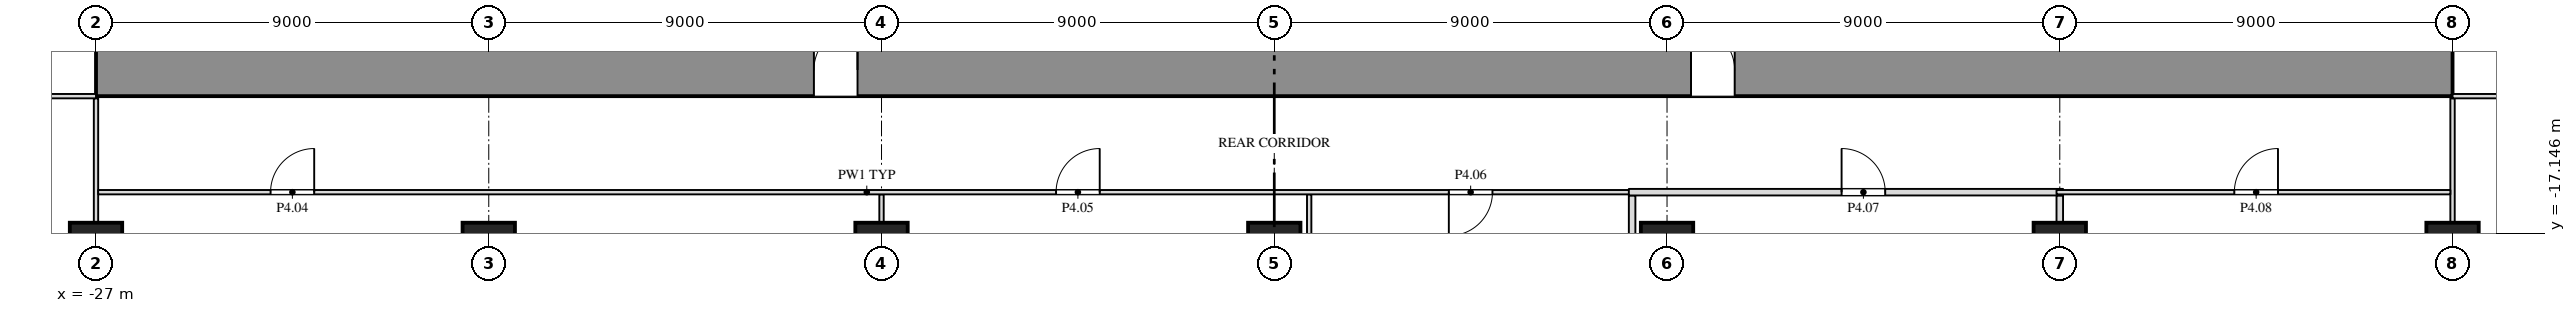
"""IFC4 building model, lengths in metres.
Left out: names, types, materials, properties, quantities, classifications, styles, units other than length and angle.
Written with IfcOpenShell. Run it as: python <this file> out.ifc"""

import sys

from ifc_helpers import new_model, si_unit, direction, frame, frame_2d, origin, origin_2d, place, context, subcontext, project, spatial, rectangle, extrude, element, fill, save


model = new_model("IFC4")
c1 = context("Model", 3, precision=1e-05, world=origin(), true_north=direction((0.0, 1.0)))
c2 = subcontext(c1, "Body", "Model", "MODEL_VIEW")
j1 = project(units=[si_unit("LENGTHUNIT", "METRE"), si_unit("PLANEANGLEUNIT", "RADIAN")], contexts=[c1])
p1 = place(None, origin())
s1 = spatial("IfcSite", under=j1, at=p1, CompositionType="ELEMENT")
p2 = place(p1, origin())
s2 = spatial("IfcBuilding", under=s1, at=p2, CompositionType="ELEMENT")
p3 = place(p2, frame((0.0, 0.0, 27.0)))
s3 = spatial("IfcBuildingStorey", under=s2, at=p3, CompositionType="ELEMENT", Elevation=27.0)
for number, where, z_axis, x_axis in (
    (1, (-27.0, -17.5, 0.0), (0.0, 0.0, 1.0), (1.0, 0.0, 0.0)),
    (2, (-18.0, -17.5, 0.0), (0.0, 0.0, 1.0), (1.0, 0.0, 0.0)),
    (3, (-9.0, -17.5, 0.0), (0.0, 0.0, 1.0), (1.0, 0.0, 0.0)),
    (4, (0.0, -17.5, 0.0), (0.0, 0.0, 1.0), (1.0, 0.0, 0.0)),
    (5, (9.0, -17.5, 0.0), (0.0, 0.0, 1.0), (1.0, 0.0, 0.0)),
    (6, (18.0, -17.5, 0.0), (0.0, 0.0, 1.0), (1.0, 0.0, 0.0)),
    (7, (27.0, -17.5, 0.0), (0.0, 0.0, 1.0), (1.0, 0.0, 0.0)),
):
    element("IfcColumn", number, at=place(p3, frame(where, z_axis=z_axis, x_axis=x_axis)), inside=s3, PredefinedType="COLUMN", context=c2, shape_type="SweptSolid", body=[
        extrude(rectangle(XDim=1.2, YDim=1.2, at=origin_2d()), origin(), (0.0, 0.0, 1.0), 6.0),
    ])
p4 = place(p3, frame((-27.0, -13.4, 0.0), z_axis=(0.0, 0.0, 1.0), x_axis=(1.0, 0.0, 0.0)))
e8 = element("IfcWall", 8, at=p4, inside=s3, PredefinedType="SHEAR", context=c2, shape_type="SweptSolid", body=[
    extrude(rectangle(XDim=54.0, YDim=1.2, at=frame_2d((27.0, 0.0))), origin(), (0.0, 0.0, 1.0), 5.7),
])
p5 = place(p4, frame((16.45, 0.0, 0.0)))
e9 = element("IfcOpeningElement", 9, at=p5, cuts=e8, PredefinedType="OPENING", context=c2, shape_type="SweptSolid", body=[
    extrude(rectangle(XDim=1.0, YDim=2.1, at=frame_2d((0.5, 1.05))), frame((0.0, 0.612, 0.0), z_axis=(0.0, -1.0, 0.0), x_axis=(1.0, 0.0, 0.0)), (0.0, 0.0, 1.0), 1.224),
])
p6 = place(p4, frame((36.55, 0.0, 0.0)))
e10 = element("IfcOpeningElement", 10, at=p6, cuts=e8, PredefinedType="OPENING", context=c2, shape_type="SweptSolid", body=[
    extrude(rectangle(XDim=1.0, YDim=2.1, at=frame_2d((0.5, 1.05))), frame((0.0, 0.612, 0.0), z_axis=(0.0, -1.0, 0.0), x_axis=(1.0, 0.0, 0.0)), (0.0, 0.0, 1.0), 1.224),
])
p7 = place(p3, frame((-27.0, -16.9, 0.0), z_axis=(0.0, 0.0, 1.0), x_axis=(0.0, 1.0, 0.0)))
e11 = element("IfcWall", 11, at=p7, inside=s3, PredefinedType="PARTITIONING", context=c2, shape_type="SweptSolid", body=[
    extrude(rectangle(XDim=2.85, YDim=0.1, at=frame_2d((1.425, 0.0))), origin(), (0.0, 0.0, 1.0), 5.088),
])
p8 = place(p3, frame((-9.0, -16.9, 0.0), z_axis=(0.0, 0.0, 1.0), x_axis=(0.0, 1.0, 0.0)))
e12 = element("IfcWall", 12, at=p8, inside=s3, PredefinedType="PARTITIONING", context=c2, shape_type="SweptSolid", body=[
    extrude(rectangle(XDim=0.65, YDim=0.1, at=frame_2d((0.325, 0.0))), origin(), (0.0, 0.0, 1.0), 5.7),
])
p9 = place(p3, frame((0.8, -27.2, 0.0), z_axis=(0.0, 0.0, 1.0), x_axis=(0.0, 1.0, 0.0)))
e13 = element("IfcWall", 13, at=p9, inside=s3, PredefinedType="PARTITIONING", context=c2, shape_type="SweptSolid", body=[
    extrude(rectangle(XDim=10.95, YDim=0.1, at=frame_2d((5.475, 0.0))), origin(), (0.0, 0.0, 1.0), 5.7),
])
p10 = place(p3, frame((8.2, -27.2, 0.0), z_axis=(0.0, 0.0, 1.0), x_axis=(0.0, 1.0, 0.0)))
e14 = element("IfcWall", 14, at=p10, inside=s3, PredefinedType="PARTITIONING", context=c2, shape_type="SweptSolid", body=[
    extrude(rectangle(XDim=10.925, YDim=0.15, at=frame_2d((5.462, 0.0))), origin(), (0.0, 0.0, 1.0), 5.7),
])
p11 = place(p3, frame((18.0, -16.9, 0.0), z_axis=(0.0, 0.0, 1.0), x_axis=(0.0, 1.0, 0.0)))
e15 = element("IfcWall", 15, at=p11, inside=s3, PredefinedType="PARTITIONING", context=c2, shape_type="SweptSolid", body=[
    extrude(rectangle(XDim=0.625, YDim=0.15, at=frame_2d((0.312, 0.0))), origin(), (0.0, 0.0, 1.0), 5.7),
])
p12 = place(p3, frame((27.0, -16.9, 0.0), z_axis=(0.0, 0.0, 1.0), x_axis=(0.0, 1.0, 0.0)))
e16 = element("IfcWall", 16, at=p12, inside=s3, PredefinedType="PARTITIONING", context=c2, shape_type="SweptSolid", body=[
    extrude(rectangle(XDim=2.85, YDim=0.1, at=frame_2d((1.425, 0.0))), origin(), (0.0, 0.0, 1.0), 5.088),
])
p13 = place(p3, frame((-26.95, -16.2, 0.0), z_axis=(0.0, 0.0, 1.0), x_axis=(1.0, 0.0, 0.0)))
e17 = element("IfcWall", 17, at=p13, inside=s3, PredefinedType="PARTITIONING", context=c2, shape_type="SweptSolid", body=[
    extrude(rectangle(XDim=35.225, YDim=0.1, at=frame_2d((17.612, 0.0))), origin(), (0.0, 0.0, 1.0), 5.7),
])
p14 = place(p13, frame((3.95, 0.0, 0.0)))
e18 = element("IfcOpeningElement", 18, at=p14, cuts=e17, PredefinedType="OPENING", context=c2, shape_type="SweptSolid", body=[
    extrude(rectangle(XDim=1.0, YDim=2.1, at=frame_2d((0.5, 1.05))), frame((0.0, 0.062, 0.0), z_axis=(0.0, -1.0, 0.0), x_axis=(1.0, 0.0, 0.0)), (0.0, 0.0, 1.0), 0.124),
])
p15 = place(p13, frame((21.95, 0.0, 0.0)))
e19 = element("IfcOpeningElement", 19, at=p15, cuts=e17, PredefinedType="OPENING", context=c2, shape_type="SweptSolid", body=[
    extrude(rectangle(XDim=1.0, YDim=2.1, at=frame_2d((0.5, 1.05))), frame((0.0, 0.062, 0.0), z_axis=(0.0, -1.0, 0.0), x_axis=(1.0, 0.0, 0.0)), (0.0, 0.0, 1.0), 0.124),
])
p16 = place(p13, frame((30.95, 0.0, 0.0)))
e20 = element("IfcOpeningElement", 20, at=p16, cuts=e17, PredefinedType="OPENING", context=c2, shape_type="SweptSolid", body=[
    extrude(rectangle(XDim=1.0, YDim=2.1, at=frame_2d((0.5, 1.05))), frame((0.0, 0.062, 0.0), z_axis=(0.0, -1.0, 0.0), x_axis=(1.0, 0.0, 0.0)), (0.0, 0.0, 1.0), 0.124),
])
p17 = place(p3, frame((8.125, -16.2, 0.0), z_axis=(0.0, 0.0, 1.0), x_axis=(1.0, 0.0, 0.0)))
e21 = element("IfcWall", 21, at=p17, inside=s3, PredefinedType="PARTITIONING", context=c2, shape_type="SweptSolid", body=[
    extrude(rectangle(XDim=9.95, YDim=0.15, at=frame_2d((4.975, 0.0))), origin(), (0.0, 0.0, 1.0), 5.7),
])
p18 = place(p17, frame((4.875, 0.0, 0.0)))
e22 = element("IfcOpeningElement", 22, at=p18, cuts=e21, PredefinedType="OPENING", context=c2, shape_type="SweptSolid", body=[
    extrude(rectangle(XDim=1.0, YDim=2.1, at=frame_2d((0.5, 1.05))), frame((0.0, 0.087, 0.0), z_axis=(0.0, -1.0, 0.0), x_axis=(1.0, 0.0, 0.0)), (0.0, 0.0, 1.0), 0.174),
])
p19 = place(p3, frame((17.925, -16.2, 0.0), z_axis=(0.0, 0.0, 1.0), x_axis=(1.0, 0.0, 0.0)))
e23 = element("IfcWall", 23, at=p19, inside=s3, PredefinedType="PARTITIONING", context=c2, shape_type="SweptSolid", body=[
    extrude(rectangle(XDim=9.025, YDim=0.1, at=frame_2d((4.512, 0.0))), origin(), (0.0, 0.0, 1.0), 5.7),
])
p20 = place(p19, frame((4.075, 0.0, 0.0)))
e24 = element("IfcOpeningElement", 24, at=p20, cuts=e23, PredefinedType="OPENING", context=c2, shape_type="SweptSolid", body=[
    extrude(rectangle(XDim=1.0, YDim=2.1, at=frame_2d((0.5, 1.05))), frame((0.0, 0.062, 0.0), z_axis=(0.0, -1.0, 0.0), x_axis=(1.0, 0.0, 0.0)), (0.0, 0.0, 1.0), 0.124),
])
p21 = place(p3, frame((-38.2, -14.0, 0.0), z_axis=(0.0, 0.0, 1.0), x_axis=(1.0, 0.0, 0.0)))
e25 = element("IfcWall", 25, at=p21, inside=s3, PredefinedType="PARTITIONING", context=c2, shape_type="SweptSolid", body=[
    extrude(rectangle(XDim=11.2, YDim=0.1, at=frame_2d((5.6, 0.0))), origin(), (0.0, 0.0, 1.0), 5.7),
])
p22 = place(p21, frame((3.2, 0.0, 0.0)))
e26 = element("IfcOpeningElement", 26, at=p22, cuts=e25, PredefinedType="OPENING", context=c2, shape_type="SweptSolid", body=[
    extrude(rectangle(XDim=1.0, YDim=2.1, at=frame_2d((0.5, 1.05))), frame((0.0, 0.062, 0.0), z_axis=(0.0, -1.0, 0.0), x_axis=(1.0, 0.0, 0.0)), (0.0, 0.0, 1.0), 0.124),
])
p23 = place(p3, frame((27.0, -14.0, 0.0), z_axis=(0.0, 0.0, 1.0), x_axis=(1.0, 0.0, 0.0)))
e27 = element("IfcWall", 27, at=p23, inside=s3, PredefinedType="PARTITIONING", context=c2, shape_type="SweptSolid", body=[
    extrude(rectangle(XDim=11.2, YDim=0.1, at=frame_2d((5.6, 0.0))), origin(), (0.0, 0.0, 1.0), 5.7),
])
p24 = place(p23, frame((7.0, 0.0, 0.0)))
e28 = element("IfcOpeningElement", 28, at=p24, cuts=e27, PredefinedType="OPENING", context=c2, shape_type="SweptSolid", body=[
    extrude(rectangle(XDim=1.0, YDim=2.1, at=frame_2d((0.5, 1.05))), frame((0.0, 0.062, 0.0), z_axis=(0.0, -1.0, 0.0), x_axis=(1.0, 0.0, 0.0)), (0.0, 0.0, 1.0), 0.124),
])
p25 = place(p14, origin())
e29 = element("IfcDoor", 29, at=p25, inside=s3, OperationType="SINGLE_SWING_RIGHT", PredefinedType="DOOR", context=c2, shape_type="SweptSolid", body=[
    extrude(rectangle(XDim=1.0, YDim=2.1, at=frame_2d((0.5, 1.05))), frame((0.0, 0.025, 0.0), z_axis=(0.0, -1.0, 0.0), x_axis=(1.0, 0.0, 0.0)), (0.0, 0.0, 1.0), 0.05),
])
fill(e18, e29)
p26 = place(p15, origin())
e30 = element("IfcDoor", 30, at=p26, inside=s3, OperationType="SINGLE_SWING_RIGHT", PredefinedType="DOOR", context=c2, shape_type="SweptSolid", body=[
    extrude(rectangle(XDim=1.0, YDim=2.1, at=frame_2d((0.5, 1.05))), frame((0.0, 0.025, 0.0), z_axis=(0.0, -1.0, 0.0), x_axis=(1.0, 0.0, 0.0)), (0.0, 0.0, 1.0), 0.05),
])
fill(e19, e30)
p27 = place(p16, origin())
e31 = element("IfcDoor", 31, at=p27, inside=s3, OperationType="SINGLE_SWING_RIGHT", PredefinedType="DOOR", context=c2, shape_type="SweptSolid", body=[
    extrude(rectangle(XDim=1.0, YDim=2.1, at=frame_2d((0.5, 1.05))), frame((0.0, 0.025, 0.0), z_axis=(0.0, -1.0, 0.0), x_axis=(1.0, 0.0, 0.0)), (0.0, 0.0, 1.0), 0.05),
])
fill(e20, e31)
p28 = place(p18, origin())
e32 = element("IfcDoor", 32, at=p28, inside=s3, OperationType="SINGLE_SWING_LEFT", PredefinedType="DOOR", context=c2, shape_type="SweptSolid", body=[
    extrude(rectangle(XDim=1.0, YDim=2.1, at=frame_2d((0.5, 1.05))), frame((0.0, 0.025, 0.0), z_axis=(0.0, -1.0, 0.0), x_axis=(1.0, 0.0, 0.0)), (0.0, 0.0, 1.0), 0.05),
])
fill(e22, e32)
p29 = place(p20, origin())
e33 = element("IfcDoor", 33, at=p29, inside=s3, OperationType="SINGLE_SWING_RIGHT", PredefinedType="DOOR", context=c2, shape_type="SweptSolid", body=[
    extrude(rectangle(XDim=1.0, YDim=2.1, at=frame_2d((0.5, 1.05))), frame((0.0, 0.025, 0.0), z_axis=(0.0, -1.0, 0.0), x_axis=(1.0, 0.0, 0.0)), (0.0, 0.0, 1.0), 0.05),
])
fill(e24, e33)
p30 = place(p5, origin())
e34 = element("IfcDoor", 34, at=p30, inside=s3, OperationType="SINGLE_SWING_RIGHT", PredefinedType="DOOR", context=c2, shape_type="SweptSolid", body=[
    extrude(rectangle(XDim=1.0, YDim=2.1, at=frame_2d((0.5, 1.05))), frame((0.0, 0.025, 0.0), z_axis=(0.0, -1.0, 0.0), x_axis=(1.0, 0.0, 0.0)), (0.0, 0.0, 1.0), 0.05),
])
fill(e9, e34)
p31 = place(p6, origin())
e35 = element("IfcDoor", 35, at=p31, inside=s3, OperationType="SINGLE_SWING_LEFT", PredefinedType="DOOR", context=c2, shape_type="SweptSolid", body=[
    extrude(rectangle(XDim=1.0, YDim=2.1, at=frame_2d((0.5, 1.05))), frame((0.0, 0.025, 0.0), z_axis=(0.0, -1.0, 0.0), x_axis=(1.0, 0.0, 0.0)), (0.0, 0.0, 1.0), 0.05),
])
fill(e10, e35)
save(model, sys.argv[1])
